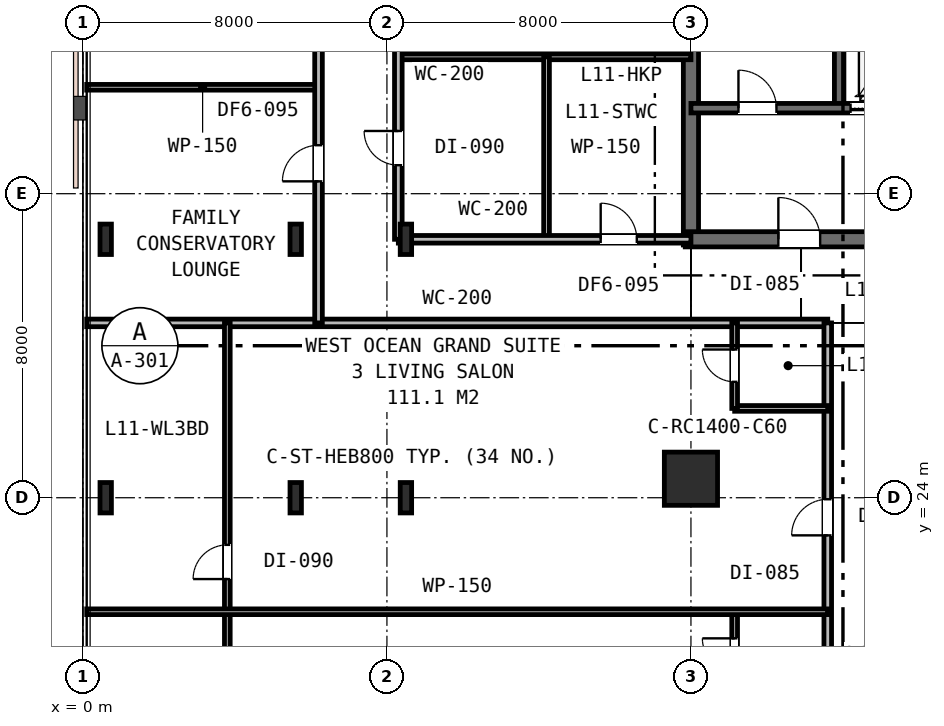
"""IFC4 building model, lengths in metres.
Left out: names, types, materials, properties, quantities, classifications, styles, units other than length and angle.
Written with IfcOpenShell. Run it as: python <this file> out.ifc"""

import sys

from ifc_helpers import new_model, si_unit, direction, frame, frame_2d, origin, origin_2d, place, context, subcontext, project, spatial, rectangle, i_section, extrude, element, fill, save


model = new_model("IFC4")
c1 = context("Model", 3, precision=1e-05, world=origin(), true_north=direction((0.0, 1.0)))
c2 = subcontext(c1, "Body", "Model", "MODEL_VIEW")
j1 = project(units=[si_unit("LENGTHUNIT", "METRE"), si_unit("PLANEANGLEUNIT", "RADIAN")], contexts=[c1])
p1 = place(None, origin())
s1 = spatial("IfcSite", under=j1, at=p1, CompositionType="ELEMENT")
p2 = place(p1, origin())
s2 = spatial("IfcBuilding", under=s1, at=p2, CompositionType="ELEMENT")
p3 = place(p2, frame((0.0, 0.0, 47.4)))
s3 = spatial("IfcBuildingStorey", under=s2, at=p3, CompositionType="ELEMENT", Elevation=47.4)
p4 = place(p3, frame((16.0, 30.65, 0.0), z_axis=(0.0, 0.0, 1.0), x_axis=(0.0, 1.0, 0.0)))
e1 = element("IfcWall", 1, at=p4, inside=s3, PredefinedType="SHEAR", context=c2, shape_type="SweptSolid", body=[
    extrude(rectangle(XDim=12.3, YDim=0.4, at=frame_2d((6.15, 0.0))), origin(), (0.0, 0.0, 1.0), 3.6),
])
p5 = place(p3, frame((15.85, 30.8, 0.0), z_axis=(0.0, 0.0, 1.0), x_axis=(1.0, 0.0, 0.0)))
e2 = element("IfcWall", 2, at=p5, inside=s3, PredefinedType="SHEAR", context=c2, shape_type="SweptSolid", body=[
    extrude(rectangle(XDim=11.2, YDim=0.4, at=frame_2d((5.6, 0.0))), origin(), (0.0, 0.0, 1.0), 3.6),
])
p6 = place(p5, frame((2.45, 0.0, 0.0)))
e3 = element("IfcOpeningElement", 3, at=p6, cuts=e2, PredefinedType="OPENING", context=c2, shape_type="SweptSolid", body=[
    extrude(rectangle(XDim=1.1, YDim=2.15, at=frame_2d((0.55, 1.075))), frame((0.0, 0.21, 0.0), z_axis=(0.0, -1.0, 0.0), x_axis=(1.0, 0.0, 0.0)), (0.0, 0.0, 1.0), 0.42),
])
p7 = place(p3, frame((19.9, 34.25, 0.0), z_axis=(0.0, 0.0, 1.0), x_axis=(0.0, 1.0, 0.0)))
e4 = element("IfcWall", 4, at=p7, inside=s3, PredefinedType="SHEAR", context=c2, shape_type="SweptSolid", body=[
    extrude(rectangle(XDim=8.65, YDim=0.25, at=frame_2d((4.325, 0.0))), origin(), (0.0, 0.0, 1.0), 3.6),
])
p8 = place(p3, frame((16.0, 34.25, 0.0), z_axis=(0.0, 0.0, 1.0), x_axis=(1.0, 0.0, 0.0)))
e5 = element("IfcWall", 5, at=p8, inside=s3, PredefinedType="SHEAR", context=c2, shape_type="SweptSolid", body=[
    extrude(rectangle(XDim=6.05, YDim=0.25, at=frame_2d((3.025, 0.0))), origin(), (0.0, 0.0, 1.0), 3.6),
])
p9 = place(p8, frame((1.25, 0.0, 0.0)))
e6 = element("IfcOpeningElement", 6, at=p9, cuts=e5, PredefinedType="OPENING", context=c2, shape_type="SweptSolid", body=[
    extrude(rectangle(XDim=1.0, YDim=2.15, at=frame_2d((0.5, 1.075))), frame((0.0, 0.135, 0.0), z_axis=(0.0, -1.0, 0.0), x_axis=(1.0, 0.0, 0.0)), (0.0, 0.0, 1.0), 0.27),
])
p10 = place(p8, frame((4.2, 0.0, 0.0)))
e7 = element("IfcOpeningElement", 7, at=p10, cuts=e5, PredefinedType="OPENING", context=c2, shape_type="SweptSolid", body=[
    extrude(rectangle(XDim=1.1, YDim=2.15, at=frame_2d((0.55, 1.075))), frame((0.0, 0.135, 0.0), z_axis=(0.0, -1.0, 0.0), x_axis=(1.0, 0.0, 0.0)), (0.0, 0.0, 1.0), 0.27),
])
p11 = place(p3, frame((8.5, 24.0, 0.0), z_axis=(0.0, 0.0, 1.0), x_axis=(1.0, 0.0, 0.0)))
e8 = element("IfcColumn", 8, at=p11, inside=s3, PredefinedType="COLUMN", context=c2, shape_type="SweptSolid", body=[
    extrude(i_section(OverallWidth=0.3, OverallDepth=0.8, WebThickness=0.018, FlangeThickness=0.033, FilletRadius=0.03, at=origin_2d()), origin(), (0.0, 0.0, 1.0), 3.6),
])
p12 = place(p3, frame((16.0, 24.5, 0.0), z_axis=(0.0, 0.0, 1.0), x_axis=(1.0, 0.0, 0.0)))
e9 = element("IfcColumn", 9, at=p12, inside=s3, PredefinedType="COLUMN", context=c2, shape_type="SweptSolid", body=[
    extrude(rectangle(XDim=1.4, YDim=1.4, at=origin_2d()), origin(), (0.0, 0.0, 1.0), 3.6),
])
for number, where, z_axis, x_axis in (
    (10, (5.6, 24.0, 0.0), (0.0, 0.0, 1.0), (1.0, 0.0, 0.0)),
    (11, (5.6, 30.8, 0.0), (0.0, 0.0, 1.0), (1.0, 0.0, 0.0)),
    (12, (8.5, 30.8, 0.0), (0.0, 0.0, 1.0), (1.0, 0.0, 0.0)),
    (13, (0.6, 24.0, 0.0), (0.0, 0.0, 1.0), (1.0, 0.0, 0.0)),
    (14, (0.6, 30.8, 0.0), (0.0, 0.0, 1.0), (1.0, 0.0, 0.0)),
):
    element("IfcColumn", number, at=place(p3, frame(where, z_axis=z_axis, x_axis=x_axis)), inside=s3, PredefinedType="COLUMN", context=c2, shape_type="SweptSolid", body=[
        extrude(i_section(OverallWidth=0.3, OverallDepth=0.8, WebThickness=0.018, FlangeThickness=0.033, FilletRadius=0.03, at=origin_2d()), origin(), (0.0, 0.0, 1.0), 3.6),
    ])
p13 = place(p3, frame((0.1, 28.6, 0.0), z_axis=(0.0, 0.0, 1.0), x_axis=(1.0, 0.0, 0.0)))
e15 = element("IfcWall", 15, at=p13, inside=s3, PredefinedType="PARTITIONING", context=c2, shape_type="SweptSolid", body=[
    extrude(rectangle(XDim=19.5, YDim=0.2, at=frame_2d((9.75, 0.0))), origin(), (0.0, 0.0, 1.0), 2.82),
])
p14 = place(p3, frame((8.3, 35.6, 0.0), z_axis=(0.0, 0.0, 1.0), x_axis=(1.0, 0.0, 0.0)))
e16 = element("IfcWall", 16, at=p14, inside=s3, PredefinedType="PARTITIONING", context=c2, shape_type="SweptSolid", body=[
    extrude(rectangle(XDim=7.7, YDim=0.15, at=frame_2d((3.85, 0.0))), origin(), (0.0, 0.0, 1.0), 2.82),
])
p15 = place(p3, frame((12.2, 30.8, 0.0), z_axis=(0.0, 0.0, 1.0), x_axis=(0.0, 1.0, 0.0)))
e17 = element("IfcWall", 17, at=p15, inside=s3, PredefinedType="PARTITIONING", context=c2, shape_type="SweptSolid", body=[
    extrude(rectangle(XDim=4.8, YDim=0.15, at=frame_2d((2.4, 0.0))), origin(), (0.0, 0.0, 1.0), 2.82),
])
p16 = place(p3, frame((8.3, 30.8, 0.0), z_axis=(0.0, 0.0, 1.0), x_axis=(1.0, 0.0, 0.0)))
e18 = element("IfcWall", 18, at=p16, inside=s3, PredefinedType="PARTITIONING", context=c2, shape_type="SweptSolid", body=[
    extrude(rectangle(XDim=7.7, YDim=0.2, at=frame_2d((3.85, 0.0))), origin(), (0.0, 0.0, 1.0), 2.82),
])
p17 = place(p16, frame((5.325, 0.0, 0.0)))
e19 = element("IfcOpeningElement", 19, at=p17, cuts=e18, PredefinedType="OPENING", context=c2, shape_type="SweptSolid", body=[
    extrude(rectangle(XDim=0.95, YDim=2.15, at=frame_2d((0.475, 1.075))), frame((0.0, 0.11, 0.0), z_axis=(0.0, -1.0, 0.0), x_axis=(1.0, 0.0, 0.0)), (0.0, 0.0, 1.0), 0.22),
])
p18 = place(p3, frame((8.3, 30.8, 0.0), z_axis=(0.0, 0.0, 1.0), x_axis=(0.0, 1.0, 0.0)))
e20 = element("IfcWall", 20, at=p18, inside=s3, PredefinedType="PARTITIONING", context=c2, shape_type="SweptSolid", body=[
    extrude(rectangle(XDim=10.2, YDim=0.2, at=frame_2d((5.1, 0.0))), origin(), (0.0, 0.0, 1.0), 2.82),
])
p19 = place(p18, frame((1.95, 0.0, 0.0)))
e21 = element("IfcOpeningElement", 21, at=p19, cuts=e20, PredefinedType="OPENING", context=c2, shape_type="SweptSolid", body=[
    extrude(rectangle(XDim=0.9, YDim=2.15, at=frame_2d((0.45, 1.075))), frame((0.0, 0.11, 0.0), z_axis=(0.0, -1.0, 0.0), x_axis=(1.0, 0.0, 0.0)), (0.0, 0.0, 1.0), 0.22),
])
p20 = place(p18, frame((5.861, 0.0, 0.0)))
e22 = element("IfcOpeningElement", 22, at=p20, cuts=e20, PredefinedType="OPENING", context=c2, shape_type="SweptSolid", body=[
    extrude(rectangle(XDim=0.95, YDim=2.15, at=frame_2d((0.475, 1.075))), frame((0.0, 0.11, 0.0), z_axis=(0.0, -1.0, 0.0), x_axis=(1.0, 0.0, 0.0)), (0.0, 0.0, 1.0), 0.22),
])
p21 = place(p3, frame((0.1, 34.8, 0.0), z_axis=(0.0, 0.0, 1.0), x_axis=(1.0, 0.0, 0.0)))
e23 = element("IfcWall", 23, at=p21, inside=s3, PredefinedType="PARTITIONING", context=c2, shape_type="SweptSolid", body=[
    extrude(rectangle(XDim=6.1, YDim=0.15, at=frame_2d((3.05, 0.0))), origin(), (0.0, 0.0, 1.0), 2.82),
])
p22 = place(p3, frame((6.2, 28.6, 0.0), z_axis=(0.0, 0.0, 1.0), x_axis=(0.0, 1.0, 0.0)))
e24 = element("IfcWall", 24, at=p22, inside=s3, PredefinedType="PARTITIONING", context=c2, shape_type="SweptSolid", body=[
    extrude(rectangle(XDim=12.4, YDim=0.2, at=frame_2d((6.2, 0.0))), origin(), (0.0, 0.0, 1.0), 2.82),
])
p23 = place(p22, frame((3.725, 0.0, 0.0)))
e25 = element("IfcOpeningElement", 25, at=p23, cuts=e24, PredefinedType="OPENING", context=c2, shape_type="SweptSolid", body=[
    extrude(rectangle(XDim=0.95, YDim=2.15, at=frame_2d((0.475, 1.075))), frame((0.0, 0.11, 0.0), z_axis=(0.0, -1.0, 0.0), x_axis=(1.0, 0.0, 0.0)), (0.0, 0.0, 1.0), 0.22),
])
p24 = place(p22, frame((8.381, 0.0, 0.0)))
e26 = element("IfcOpeningElement", 26, at=p24, cuts=e24, PredefinedType="OPENING", context=c2, shape_type="SweptSolid", body=[
    extrude(rectangle(XDim=0.95, YDim=2.15, at=frame_2d((0.475, 1.075))), frame((0.0, 0.11, 0.0), z_axis=(0.0, -1.0, 0.0), x_axis=(1.0, 0.0, 0.0)), (0.0, 0.0, 1.0), 0.22),
])
p25 = place(p3, frame((19.6, 5.6, 0.0), z_axis=(0.0, 0.0, 1.0), x_axis=(0.0, 1.0, 0.0)))
e27 = element("IfcWall", 27, at=p25, inside=s3, PredefinedType="PARTITIONING", context=c2, shape_type="SweptSolid", body=[
    extrude(rectangle(XDim=23.0, YDim=0.2, at=frame_2d((11.5, 0.0))), origin(), (0.0, 0.0, 1.0), 2.82),
])
p26 = place(p25, frame((2.19, 0.0, 0.0)))
e28 = element("IfcOpeningElement", 28, at=p26, cuts=e27, PredefinedType="OPENING", context=c2, shape_type="SweptSolid", body=[
    extrude(rectangle(XDim=0.95, YDim=2.15, at=frame_2d((0.475, 1.075))), frame((0.0, 0.11, 0.0), z_axis=(0.0, -1.0, 0.0), x_axis=(1.0, 0.0, 0.0)), (0.0, 0.0, 1.0), 0.22),
])
p27 = place(p25, frame((9.92, 0.0, 0.0)))
e29 = element("IfcOpeningElement", 29, at=p27, cuts=e27, PredefinedType="OPENING", context=c2, shape_type="SweptSolid", body=[
    extrude(rectangle(XDim=0.95, YDim=2.15, at=frame_2d((0.475, 1.075))), frame((0.0, 0.11, 0.0), z_axis=(0.0, -1.0, 0.0), x_axis=(1.0, 0.0, 0.0)), (0.0, 0.0, 1.0), 0.22),
])
p28 = place(p25, frame((17.41, 0.0, 0.0)))
e30 = element("IfcOpeningElement", 30, at=p28, cuts=e27, PredefinedType="OPENING", context=c2, shape_type="SweptSolid", body=[
    extrude(rectangle(XDim=0.95, YDim=2.15, at=frame_2d((0.475, 1.075))), frame((0.0, 0.11, 0.0), z_axis=(0.0, -1.0, 0.0), x_axis=(1.0, 0.0, 0.0)), (0.0, 0.0, 1.0), 0.22),
])
p29 = place(p3, frame((3.8, 5.6, 0.0), z_axis=(0.0, 0.0, 1.0), x_axis=(0.0, 1.0, 0.0)))
e31 = element("IfcWall", 31, at=p29, inside=s3, PredefinedType="PARTITIONING", context=c2, shape_type="SweptSolid", body=[
    extrude(rectangle(XDim=23.0, YDim=0.15, at=frame_2d((11.5, 0.0))), origin(), (0.0, 0.0, 1.0), 2.82),
])
p30 = place(p29, frame((2.575, 0.0, 0.0)))
e32 = element("IfcOpeningElement", 32, at=p30, cuts=e31, PredefinedType="OPENING", context=c2, shape_type="SweptSolid", body=[
    extrude(rectangle(XDim=0.9, YDim=2.15, at=frame_2d((0.45, 1.075))), frame((0.0, 0.085, 0.0), z_axis=(0.0, -1.0, 0.0), x_axis=(1.0, 0.0, 0.0)), (0.0, 0.0, 1.0), 0.17),
])
p31 = place(p29, frame((10.365, 0.0, 0.0)))
e33 = element("IfcOpeningElement", 33, at=p31, cuts=e31, PredefinedType="OPENING", context=c2, shape_type="SweptSolid", body=[
    extrude(rectangle(XDim=0.9, YDim=2.15, at=frame_2d((0.45, 1.075))), frame((0.0, 0.085, 0.0), z_axis=(0.0, -1.0, 0.0), x_axis=(1.0, 0.0, 0.0)), (0.0, 0.0, 1.0), 0.17),
])
p32 = place(p29, frame((16.26, 0.0, 0.0)))
e34 = element("IfcOpeningElement", 34, at=p32, cuts=e31, PredefinedType="OPENING", context=c2, shape_type="SweptSolid", body=[
    extrude(rectangle(XDim=0.9, YDim=2.15, at=frame_2d((0.45, 1.075))), frame((0.0, 0.085, 0.0), z_axis=(0.0, -1.0, 0.0), x_axis=(1.0, 0.0, 0.0)), (0.0, 0.0, 1.0), 0.17),
])
p33 = place(p3, frame((17.15, 18.75, 0.0), z_axis=(0.0, 0.0, 1.0), x_axis=(0.0, 1.0, 0.0)))
e35 = element("IfcWall", 35, at=p33, inside=s3, PredefinedType="PARTITIONING", context=c2, shape_type="SweptSolid", body=[
    extrude(rectangle(XDim=2.25, YDim=0.15, at=frame_2d((1.125, 0.0))), origin(), (0.0, 0.0, 1.0), 3.33),
])
p34 = place(p33, frame((0.7, 0.0, 0.0)))
e36 = element("IfcOpeningElement", 36, at=p34, cuts=e35, PredefinedType="OPENING", context=c2, shape_type="SweptSolid", body=[
    extrude(rectangle(XDim=0.85, YDim=2.15, at=frame_2d((0.425, 1.075))), frame((0.0, 0.085, 0.0), z_axis=(0.0, -1.0, 0.0), x_axis=(1.0, 0.0, 0.0)), (0.0, 0.0, 1.0), 0.17),
])
p35 = place(p3, frame((0.1, 21.0, 0.0), z_axis=(0.0, 0.0, 1.0), x_axis=(1.0, 0.0, 0.0)))
e37 = element("IfcWall", 37, at=p35, inside=s3, PredefinedType="PARTITIONING", context=c2, shape_type="SweptSolid", body=[
    extrude(rectangle(XDim=19.5, YDim=0.15, at=frame_2d((9.75, 0.0))), origin(), (0.0, 0.0, 1.0), 2.82),
])
p36 = place(p3, frame((17.15, 26.35, 0.0), z_axis=(0.0, 0.0, 1.0), x_axis=(1.0, 0.0, 0.0)))
e38 = element("IfcWall", 38, at=p36, inside=s3, PredefinedType="PARTITIONING", context=c2, shape_type="SweptSolid", body=[
    extrude(rectangle(XDim=2.45, YDim=0.15, at=frame_2d((1.225, 0.0))), origin(), (0.0, 0.0, 1.0), 2.96),
])
p37 = place(p3, frame((17.15, 26.35, 0.0), z_axis=(0.0, 0.0, 1.0), x_axis=(0.0, 1.0, 0.0)))
e39 = element("IfcWall", 39, at=p37, inside=s3, PredefinedType="PARTITIONING", context=c2, shape_type="SweptSolid", body=[
    extrude(rectangle(XDim=2.25, YDim=0.15, at=frame_2d((1.125, 0.0))), origin(), (0.0, 0.0, 1.0), 3.33),
])
p38 = place(p37, frame((0.7, 0.0, 0.0)))
e40 = element("IfcOpeningElement", 40, at=p38, cuts=e39, PredefinedType="OPENING", context=c2, shape_type="SweptSolid", body=[
    extrude(rectangle(XDim=0.85, YDim=2.15, at=frame_2d((0.425, 1.075))), frame((0.0, 0.085, 0.0), z_axis=(0.0, -1.0, 0.0), x_axis=(1.0, 0.0, 0.0)), (0.0, 0.0, 1.0), 0.17),
])
p39 = place(p9, origin())
e41 = element("IfcDoor", 41, at=p39, inside=s3, OperationType="SINGLE_SWING_LEFT", PredefinedType="DOOR", context=c2, shape_type="SweptSolid", body=[
    extrude(rectangle(XDim=1.0, YDim=2.15, at=frame_2d((0.5, 1.075))), frame((0.0, 0.025, 0.0), z_axis=(0.0, -1.0, 0.0), x_axis=(1.0, 0.0, 0.0)), (0.0, 0.0, 1.0), 0.05),
])
fill(e6, e41)
p40 = place(p6, origin())
e42 = element("IfcDoor", 42, at=p40, inside=s3, OperationType="SINGLE_SWING_LEFT", PredefinedType="DOOR", context=c2, shape_type="SweptSolid", body=[
    extrude(rectangle(XDim=1.1, YDim=2.15, at=frame_2d((0.55, 1.075))), frame((0.0, 0.025, 0.0), z_axis=(0.0, -1.0, 0.0), x_axis=(1.0, 0.0, 0.0)), (0.0, 0.0, 1.0), 0.05),
])
fill(e3, e42)
p41 = place(p17, origin())
e43 = element("IfcDoor", 43, at=p41, inside=s3, OperationType="SINGLE_SWING_LEFT", PredefinedType="DOOR", context=c2, shape_type="SweptSolid", body=[
    extrude(rectangle(XDim=0.95, YDim=2.15, at=frame_2d((0.475, 1.075))), frame((0.0, 0.025, 0.0), z_axis=(0.0, -1.0, 0.0), x_axis=(1.0, 0.0, 0.0)), (0.0, 0.0, 1.0), 0.05),
])
fill(e19, e43)
p42 = place(p19, origin())
e44 = element("IfcDoor", 44, at=p42, inside=s3, OperationType="SINGLE_SWING_RIGHT", PredefinedType="DOOR", context=c2, shape_type="SweptSolid", body=[
    extrude(rectangle(XDim=0.9, YDim=2.15, at=frame_2d((0.45, 1.075))), frame((0.0, 0.025, 0.0), z_axis=(0.0, -1.0, 0.0), x_axis=(1.0, 0.0, 0.0)), (0.0, 0.0, 1.0), 0.05),
])
fill(e21, e44)
p43 = place(p23, origin())
e45 = element("IfcDoor", 45, at=p43, inside=s3, OperationType="SINGLE_SWING_LEFT", PredefinedType="DOOR", context=c2, shape_type="SweptSolid", body=[
    extrude(rectangle(XDim=0.95, YDim=2.15, at=frame_2d((0.475, 1.075))), frame((0.0, 0.025, 0.0), z_axis=(0.0, -1.0, 0.0), x_axis=(1.0, 0.0, 0.0)), (0.0, 0.0, 1.0), 0.05),
])
fill(e25, e45)
p44 = place(p34, origin())
e46 = element("IfcDoor", 46, at=p44, inside=s3, OperationType="SINGLE_SWING_RIGHT", PredefinedType="DOOR", context=c2, shape_type="SweptSolid", body=[
    extrude(rectangle(XDim=0.85, YDim=2.15, at=frame_2d((0.425, 1.075))), frame((0.0, 0.025, 0.0), z_axis=(0.0, -1.0, 0.0), x_axis=(1.0, 0.0, 0.0)), (0.0, 0.0, 1.0), 0.05),
])
fill(e36, e46)
p45 = place(p28, origin())
e47 = element("IfcDoor", 47, at=p45, inside=s3, OperationType="SINGLE_SWING_LEFT", PredefinedType="DOOR", context=c2, shape_type="SweptSolid", body=[
    extrude(rectangle(XDim=0.95, YDim=2.15, at=frame_2d((0.475, 1.075))), frame((0.0, 0.025, 0.0), z_axis=(0.0, -1.0, 0.0), x_axis=(1.0, 0.0, 0.0)), (0.0, 0.0, 1.0), 0.05),
])
fill(e30, e47)
p46 = place(p38, origin())
e48 = element("IfcDoor", 48, at=p46, inside=s3, OperationType="SINGLE_SWING_RIGHT", PredefinedType="DOOR", context=c2, shape_type="SweptSolid", body=[
    extrude(rectangle(XDim=0.85, YDim=2.15, at=frame_2d((0.425, 1.075))), frame((0.0, 0.025, 0.0), z_axis=(0.0, -1.0, 0.0), x_axis=(1.0, 0.0, 0.0)), (0.0, 0.0, 1.0), 0.05),
])
fill(e40, e48)
p47 = place(p32, origin())
e49 = element("IfcDoor", 49, at=p47, inside=s3, OperationType="SINGLE_SWING_LEFT", PredefinedType="DOOR", context=c2, shape_type="SweptSolid", body=[
    extrude(rectangle(XDim=0.9, YDim=2.15, at=frame_2d((0.45, 1.075))), frame((0.0, 0.025, 0.0), z_axis=(0.0, -1.0, 0.0), x_axis=(1.0, 0.0, 0.0)), (0.0, 0.0, 1.0), 0.05),
])
fill(e34, e49)
p48 = place(p10, origin())
e50 = element("IfcDoor", 50, at=p48, inside=s3, OperationType="DOUBLE_DOOR_SLIDING", PredefinedType="DOOR", context=c2, shape_type="SweptSolid", body=[
    extrude(rectangle(XDim=1.1, YDim=2.15, at=frame_2d((0.55, 1.075))), frame((0.0, 0.025, 0.0), z_axis=(0.0, -1.0, 0.0), x_axis=(1.0, 0.0, 0.0)), (0.0, 0.0, 1.0), 0.05),
])
fill(e7, e50)
save(model, sys.argv[1])
